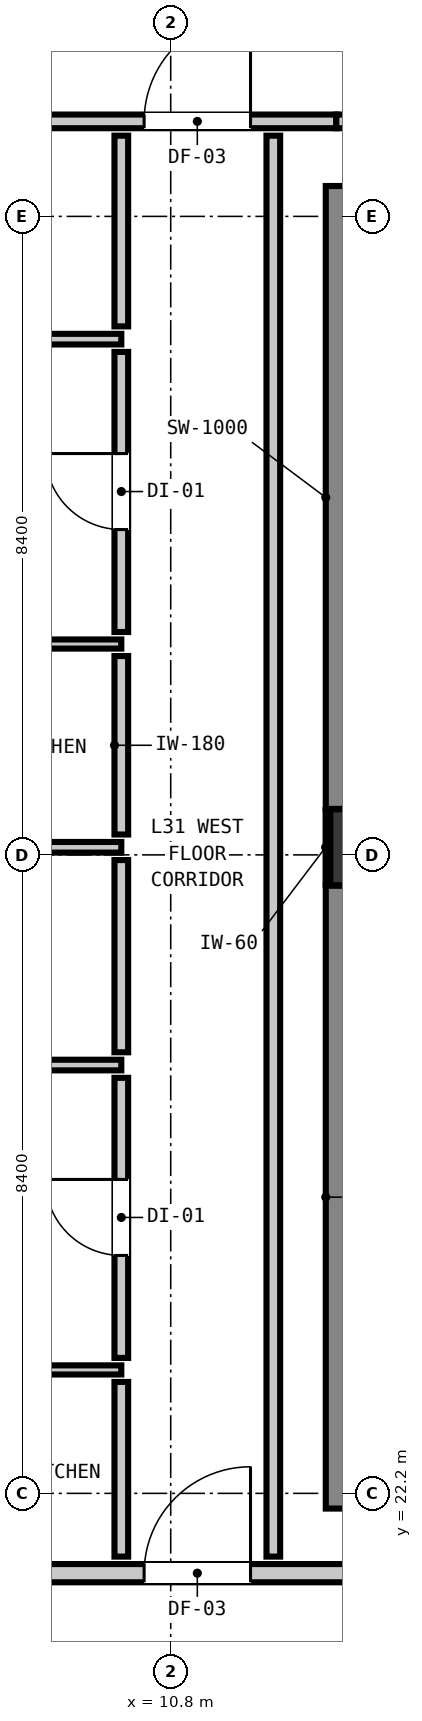
"""IFC4 building model, lengths in metres.
Left out: names, types, materials, properties, quantities, classifications, styles, units other than length and angle.
Written with IfcOpenShell. Run it as: python <this file> out.ifc"""

import sys

from ifc_helpers import new_model, si_unit, direction, frame, frame_2d, origin, origin_2d, place, context, subcontext, project, spatial, rectangle, extrude, element, fill, save


model = new_model("IFC4")
c1 = context("Model", 3, precision=1e-05, world=origin(), true_north=direction((0.0, 1.0)))
c2 = subcontext(c1, "Body", "Model", "MODEL_VIEW")
j1 = project(units=[si_unit("LENGTHUNIT", "METRE"), si_unit("PLANEANGLEUNIT", "RADIAN")], contexts=[c1])
p1 = place(None, origin())
s1 = spatial("IfcSite", under=j1, at=p1, CompositionType="ELEMENT")
p2 = place(p1, origin())
s2 = spatial("IfcBuilding", under=s1, at=p2, CompositionType="ELEMENT")
p3 = place(p2, frame((0.0, 0.0, 109.4)))
s3 = spatial("IfcBuildingStorey", under=s2, at=p3, CompositionType="ELEMENT", Elevation=109.4)
p4 = place(p3, frame((13.4, 30.7, 0.0), z_axis=(0.0, 0.0, 1.0), x_axis=(1.0, 0.0, 0.0)))
e1 = element("IfcColumn", 1, at=p4, inside=s3, PredefinedType="COLUMN", context=c2, shape_type="SweptSolid", body=[
    extrude(rectangle(XDim=1.0, YDim=1.0, at=origin_2d()), origin(), (0.0, 0.0, 1.0), 3.32),
])
p5 = place(p3, frame((13.34, 22.0, 0.0), z_axis=(0.0, 0.0, 1.0), x_axis=(0.0, 1.0, 0.0)))
e2 = element("IfcWall", 2, at=p5, inside=s3, PredefinedType="SHEAR", context=c2, shape_type="SweptSolid", body=[
    extrude(rectangle(XDim=8.195, YDim=1.0, at=frame_2d((4.098, 0.0))), origin(), (0.0, 0.0, 1.0), 3.32),
])
p6 = place(p3, frame((13.34, 31.205, 0.0), z_axis=(0.0, 0.0, 1.0), x_axis=(0.0, 1.0, 0.0)))
e3 = element("IfcWall", 3, at=p6, inside=s3, PredefinedType="SHEAR", context=c2, shape_type="SweptSolid", body=[
    extrude(rectangle(XDim=8.195, YDim=1.0, at=frame_2d((4.097, 0.0))), origin(), (0.0, 0.0, 1.0), 3.32),
])
p7 = place(p3, frame((3.207, 21.15, 0.0), z_axis=(0.0, 0.0, 1.0), x_axis=(1.0, 0.0, 0.0)))
e4 = element("IfcWall", 4, at=p7, inside=s3, PredefinedType="PARTITIONING", context=c2, shape_type="SweptSolid", body=[
    extrude(rectangle(XDim=39.386, YDim=0.24, at=frame_2d((19.693, 0.0))), origin(), (0.0, 0.0, 1.0), 3.08),
])
p8 = place(p7, frame((15.003, 0.0, 0.0)))
e5 = element("IfcOpeningElement", 5, at=p8, cuts=e4, PredefinedType="OPENING", context=c2, shape_type="SweptSolid", body=[
    extrude(rectangle(XDim=1.1, YDim=2.15, at=frame_2d((0.55, 1.075))), frame((0.0, 0.13, 0.0), z_axis=(0.0, -1.0, 0.0), x_axis=(1.0, 0.0, 0.0)), (0.0, 0.0, 1.0), 0.26),
])
p9 = place(p7, frame((7.243, 0.0, 0.0)))
e6 = element("IfcOpeningElement", 6, at=p9, cuts=e4, PredefinedType="OPENING", context=c2, shape_type="SweptSolid", body=[
    extrude(rectangle(XDim=1.4, YDim=2.15, at=frame_2d((0.7, 1.075))), frame((0.0, 0.13, 0.0), z_axis=(0.0, -1.0, 0.0), x_axis=(1.0, 0.0, 0.0)), (0.0, 0.0, 1.0), 0.26),
])
p10 = place(p7, frame((34.843, 0.0, 0.0)))
e7 = element("IfcOpeningElement", 7, at=p10, cuts=e4, PredefinedType="OPENING", context=c2, shape_type="SweptSolid", body=[
    extrude(rectangle(XDim=1.4, YDim=2.15, at=frame_2d((0.7, 1.075))), frame((0.0, 0.13, 0.0), z_axis=(0.0, -1.0, 0.0), x_axis=(1.0, 0.0, 0.0)), (0.0, 0.0, 1.0), 0.26),
])
p11 = place(p3, frame((4.071, 40.25, 0.0), z_axis=(0.0, 0.0, 1.0), x_axis=(1.0, 0.0, 0.0)))
e8 = element("IfcWall", 8, at=p11, inside=s3, PredefinedType="PARTITIONING", context=c2, shape_type="SweptSolid", body=[
    extrude(rectangle(XDim=8.908, YDim=0.18, at=frame_2d((4.454, 0.0))), origin(), (0.0, 0.0, 1.0), 2.565),
])
p12 = place(p11, frame((6.379, 0.0, 0.0)))
e9 = element("IfcOpeningElement", 9, at=p12, cuts=e8, PredefinedType="OPENING", context=c2, shape_type="SweptSolid", body=[
    extrude(rectangle(XDim=1.4, YDim=2.15, at=frame_2d((0.7, 1.075))), frame((0.0, 0.1, 0.0), z_axis=(0.0, -1.0, 0.0), x_axis=(1.0, 0.0, 0.0)), (0.0, 0.0, 1.0), 0.2),
])
p13 = place(p3, frame((12.979, 40.25, 0.0), z_axis=(0.0, 0.0, 1.0), x_axis=(1.0, 0.0, 0.0)))
e10 = element("IfcWall", 10, at=p13, inside=s3, PredefinedType="PARTITIONING", context=c2, shape_type="SweptSolid", body=[
    extrude(rectangle(XDim=29.614, YDim=0.18, at=frame_2d((14.807, 0.0))), origin(), (0.0, 0.0, 1.0), 3.08),
])
p14 = place(p13, frame((4.456, 0.0, 0.0)))
e11 = element("IfcOpeningElement", 11, at=p14, cuts=e10, PredefinedType="OPENING", context=c2, shape_type="SweptSolid", body=[
    extrude(rectangle(XDim=1.4, YDim=2.15, at=frame_2d((0.7, 1.075))), frame((0.0, 0.1, 0.0), z_axis=(0.0, -1.0, 0.0), x_axis=(1.0, 0.0, 0.0)), (0.0, 0.0, 1.0), 0.2),
])
p15 = place(p13, frame((25.071, 0.0, 0.0)))
e12 = element("IfcOpeningElement", 12, at=p15, cuts=e10, PredefinedType="OPENING", context=c2, shape_type="SweptSolid", body=[
    extrude(rectangle(XDim=1.4, YDim=2.15, at=frame_2d((0.7, 1.075))), frame((0.0, 0.1, 0.0), z_axis=(0.0, -1.0, 0.0), x_axis=(1.0, 0.0, 0.0)), (0.0, 0.0, 1.0), 0.2),
])
p16 = place(p3, frame((3.207, 27.835, 0.0), z_axis=(0.0, 0.0, 1.0), x_axis=(1.0, 0.0, 0.0)))
e13 = element("IfcWall", 13, at=p16, inside=s3, PredefinedType="PARTITIONING", context=c2, shape_type="SweptSolid", body=[
    extrude(rectangle(XDim=6.943, YDim=0.14, at=frame_2d((3.471, 0.0))), origin(), (0.0, 0.0, 1.0), 3.08),
])
p17 = place(p16, frame((5.006, 0.0, 0.0)))
e14 = element("IfcOpeningElement", 14, at=p17, cuts=e13, PredefinedType="OPENING", context=c2, shape_type="SweptSolid", body=[
    extrude(rectangle(XDim=0.86, YDim=2.02, at=frame_2d((0.43, 1.01))), frame((0.0, 0.08, 0.0), z_axis=(0.0, -1.0, 0.0), x_axis=(1.0, 0.0, 0.0)), (0.0, 0.0, 1.0), 0.16),
])
p18 = place(p16, frame((1.537, 0.0, 0.0)))
e15 = element("IfcOpeningElement", 15, at=p18, cuts=e13, PredefinedType="OPENING", context=c2, shape_type="SweptSolid", body=[
    extrude(rectangle(XDim=0.9, YDim=2.1, at=frame_2d((0.45, 1.05))), frame((0.0, 0.08, 0.0), z_axis=(0.0, -1.0, 0.0), x_axis=(1.0, 0.0, 0.0)), (0.0, 0.0, 1.0), 0.16),
])
p19 = place(p3, frame((4.232, 30.7, 0.0), z_axis=(0.0, 0.0, 1.0), x_axis=(1.0, 0.0, 0.0)))
e16 = element("IfcWall", 16, at=p19, inside=s3, PredefinedType="PARTITIONING", context=c2, shape_type="SweptSolid", body=[
    extrude(rectangle(XDim=5.918, YDim=0.14, at=frame_2d((2.959, 0.0))), origin(), (0.0, 0.0, 1.0), 2.315),
])
p20 = place(p3, frame((3.207, 37.385, 0.0), z_axis=(0.0, 0.0, 1.0), x_axis=(1.0, 0.0, 0.0)))
e17 = element("IfcWall", 17, at=p20, inside=s3, PredefinedType="PARTITIONING", context=c2, shape_type="SweptSolid", body=[
    extrude(rectangle(XDim=6.943, YDim=0.14, at=frame_2d((3.471, 0.0))), origin(), (0.0, 0.0, 1.0), 3.08),
])
p21 = place(p20, frame((5.006, 0.0, 0.0)))
e18 = element("IfcOpeningElement", 18, at=p21, cuts=e17, PredefinedType="OPENING", context=c2, shape_type="SweptSolid", body=[
    extrude(rectangle(XDim=0.86, YDim=2.02, at=frame_2d((0.43, 1.01))), frame((0.0, 0.08, 0.0), z_axis=(0.0, -1.0, 0.0), x_axis=(1.0, 0.0, 0.0)), (0.0, 0.0, 1.0), 0.16),
])
p22 = place(p20, frame((1.537, 0.0, 0.0)))
e19 = element("IfcOpeningElement", 19, at=p22, cuts=e17, PredefinedType="OPENING", context=c2, shape_type="SweptSolid", body=[
    extrude(rectangle(XDim=0.9, YDim=2.1, at=frame_2d((0.45, 1.05))), frame((0.0, 0.08, 0.0), z_axis=(0.0, -1.0, 0.0), x_axis=(1.0, 0.0, 0.0)), (0.0, 0.0, 1.0), 0.16),
])
p23 = place(p3, frame((3.207, 23.824, 0.0), z_axis=(0.0, 0.0, 1.0), x_axis=(1.0, 0.0, 0.0)))
e20 = element("IfcWall", 20, at=p23, inside=s3, PredefinedType="PARTITIONING", context=c2, shape_type="SweptSolid", body=[
    extrude(rectangle(XDim=6.943, YDim=0.12, at=frame_2d((3.471, 0.0))), origin(), (0.0, 0.0, 1.0), 3.08),
])
p24 = place(p23, frame((3.018, 0.0, 0.0)))
e21 = element("IfcOpeningElement", 21, at=p24, cuts=e20, PredefinedType="OPENING", context=c2, shape_type="SweptSolid", body=[
    extrude(rectangle(XDim=0.9, YDim=2.1, at=frame_2d((0.45, 1.05))), frame((0.0, 0.07, 0.0), z_axis=(0.0, -1.0, 0.0), x_axis=(1.0, 0.0, 0.0)), (0.0, 0.0, 1.0), 0.14),
])
p25 = place(p3, frame((3.207, 33.374, 0.0), z_axis=(0.0, 0.0, 1.0), x_axis=(1.0, 0.0, 0.0)))
e22 = element("IfcWall", 22, at=p25, inside=s3, PredefinedType="PARTITIONING", context=c2, shape_type="SweptSolid", body=[
    extrude(rectangle(XDim=6.943, YDim=0.12, at=frame_2d((3.471, 0.0))), origin(), (0.0, 0.0, 1.0), 3.08),
])
p26 = place(p25, frame((3.018, 0.0, 0.0)))
e23 = element("IfcOpeningElement", 23, at=p26, cuts=e22, PredefinedType="OPENING", context=c2, shape_type="SweptSolid", body=[
    extrude(rectangle(XDim=0.9, YDim=2.1, at=frame_2d((0.45, 1.05))), frame((0.0, 0.07, 0.0), z_axis=(0.0, -1.0, 0.0), x_axis=(1.0, 0.0, 0.0)), (0.0, 0.0, 1.0), 0.14),
])
p27 = place(p3, frame((10.15, 21.368, 0.0), z_axis=(0.0, 0.0, 1.0), x_axis=(0.0, 1.0, 0.0)))
e24 = element("IfcWall", 24, at=p27, inside=s3, PredefinedType="PARTITIONING", context=c2, shape_type="SweptSolid", body=[
    extrude(rectangle(XDim=2.298, YDim=0.18, at=frame_2d((1.149, 0.0))), origin(), (0.0, 0.0, 1.0), 3.08),
])
p28 = place(p3, frame((10.15, 23.982, 0.0), z_axis=(0.0, 0.0, 1.0), x_axis=(0.0, 1.0, 0.0)))
e25 = element("IfcWall", 25, at=p28, inside=s3, PredefinedType="PARTITIONING", context=c2, shape_type="SweptSolid", body=[
    extrude(rectangle(XDim=3.685, YDim=0.18, at=frame_2d((1.843, 0.0))), origin(), (0.0, 0.0, 1.0), 3.08),
])
p29 = place(p28, frame((1.348, 0.0, 0.0)))
e26 = element("IfcOpeningElement", 26, at=p29, cuts=e25, PredefinedType="OPENING", context=c2, shape_type="SweptSolid", body=[
    extrude(rectangle(XDim=1.0, YDim=2.15, at=frame_2d((0.5, 1.075))), frame((0.0, 0.1, 0.0), z_axis=(0.0, -1.0, 0.0), x_axis=(1.0, 0.0, 0.0)), (0.0, 0.0, 1.0), 0.2),
])
p30 = place(p3, frame((10.15, 28.003, 0.0), z_axis=(0.0, 0.0, 1.0), x_axis=(0.0, 1.0, 0.0)))
e27 = element("IfcWall", 27, at=p30, inside=s3, PredefinedType="PARTITIONING", context=c2, shape_type="SweptSolid", body=[
    extrude(rectangle(XDim=2.529, YDim=0.18, at=frame_2d((1.265, 0.0))), origin(), (0.0, 0.0, 1.0), 3.08),
])
p31 = place(p3, frame((10.15, 30.868, 0.0), z_axis=(0.0, 0.0, 1.0), x_axis=(0.0, 1.0, 0.0)))
e28 = element("IfcWall", 28, at=p31, inside=s3, PredefinedType="PARTITIONING", context=c2, shape_type="SweptSolid", body=[
    extrude(rectangle(XDim=2.348, YDim=0.18, at=frame_2d((1.174, 0.0))), origin(), (0.0, 0.0, 1.0), 3.08),
])
p32 = place(p3, frame((10.15, 33.532, 0.0), z_axis=(0.0, 0.0, 1.0), x_axis=(0.0, 1.0, 0.0)))
e29 = element("IfcWall", 29, at=p32, inside=s3, PredefinedType="PARTITIONING", context=c2, shape_type="SweptSolid", body=[
    extrude(rectangle(XDim=3.685, YDim=0.18, at=frame_2d((1.843, 0.0))), origin(), (0.0, 0.0, 1.0), 3.08),
])
p33 = place(p32, frame((1.348, 0.0, 0.0)))
e30 = element("IfcOpeningElement", 30, at=p33, cuts=e29, PredefinedType="OPENING", context=c2, shape_type="SweptSolid", body=[
    extrude(rectangle(XDim=1.0, YDim=2.15, at=frame_2d((0.5, 1.075))), frame((0.0, 0.1, 0.0), z_axis=(0.0, -1.0, 0.0), x_axis=(1.0, 0.0, 0.0)), (0.0, 0.0, 1.0), 0.2),
])
p34 = place(p3, frame((10.15, 37.553, 0.0), z_axis=(0.0, 0.0, 1.0), x_axis=(0.0, 1.0, 0.0)))
e31 = element("IfcWall", 31, at=p34, inside=s3, PredefinedType="PARTITIONING", context=c2, shape_type="SweptSolid", body=[
    extrude(rectangle(XDim=2.509, YDim=0.18, at=frame_2d((1.254, 0.0))), origin(), (0.0, 0.0, 1.0), 3.08),
])
p35 = place(p3, frame((12.15, 21.368, 0.0), z_axis=(0.0, 0.0, 1.0), x_axis=(0.0, 1.0, 0.0)))
e32 = element("IfcWall", 32, at=p35, inside=s3, PredefinedType="PARTITIONING", context=c2, shape_type="SweptSolid", body=[
    extrude(rectangle(XDim=18.694, YDim=0.18, at=frame_2d((9.347, 0.0))), origin(), (0.0, 0.0, 1.0), 3.08),
])
p36 = place(p3, frame((12.868, 30.21, 0.0), z_axis=(0.0, 0.0, 1.0), x_axis=(0.0, 1.0, 0.0)))
e33 = element("IfcWall", 33, at=p36, inside=s3, PredefinedType="PARTITIONING", context=c2, shape_type="SweptSolid", body=[
    extrude(rectangle(XDim=0.98, YDim=0.06, at=frame_2d((0.49, 0.0))), origin(), (0.0, 0.0, 1.0), 1.45),
])
p37 = place(p9, origin())
e34 = element("IfcDoor", 34, at=p37, inside=s3, OperationType="SINGLE_SWING_RIGHT", PredefinedType="DOOR", context=c2, shape_type="SweptSolid", body=[
    extrude(rectangle(XDim=1.4, YDim=2.15, at=frame_2d((0.7, 1.075))), frame((0.0, 0.025, 0.0), z_axis=(0.0, -1.0, 0.0), x_axis=(1.0, 0.0, 0.0)), (0.0, 0.0, 1.0), 0.05),
])
fill(e6, e34)
p38 = place(p12, origin())
e35 = element("IfcDoor", 35, at=p38, inside=s3, OperationType="SINGLE_SWING_RIGHT", PredefinedType="DOOR", context=c2, shape_type="SweptSolid", body=[
    extrude(rectangle(XDim=1.4, YDim=2.15, at=frame_2d((0.7, 1.075))), frame((0.0, 0.025, 0.0), z_axis=(0.0, -1.0, 0.0), x_axis=(1.0, 0.0, 0.0)), (0.0, 0.0, 1.0), 0.05),
])
fill(e9, e35)
p39 = place(p29, origin())
e36 = element("IfcDoor", 36, at=p39, inside=s3, OperationType="SINGLE_SWING_RIGHT", PredefinedType="DOOR", context=c2, shape_type="SweptSolid", body=[
    extrude(rectangle(XDim=1.0, YDim=2.15, at=frame_2d((0.5, 1.075))), frame((0.0, 0.025, 0.0), z_axis=(0.0, -1.0, 0.0), x_axis=(1.0, 0.0, 0.0)), (0.0, 0.0, 1.0), 0.05),
])
fill(e26, e36)
p40 = place(p33, origin())
e37 = element("IfcDoor", 37, at=p40, inside=s3, OperationType="SINGLE_SWING_RIGHT", PredefinedType="DOOR", context=c2, shape_type="SweptSolid", body=[
    extrude(rectangle(XDim=1.0, YDim=2.15, at=frame_2d((0.5, 1.075))), frame((0.0, 0.025, 0.0), z_axis=(0.0, -1.0, 0.0), x_axis=(1.0, 0.0, 0.0)), (0.0, 0.0, 1.0), 0.05),
])
fill(e30, e37)
save(model, sys.argv[1])
